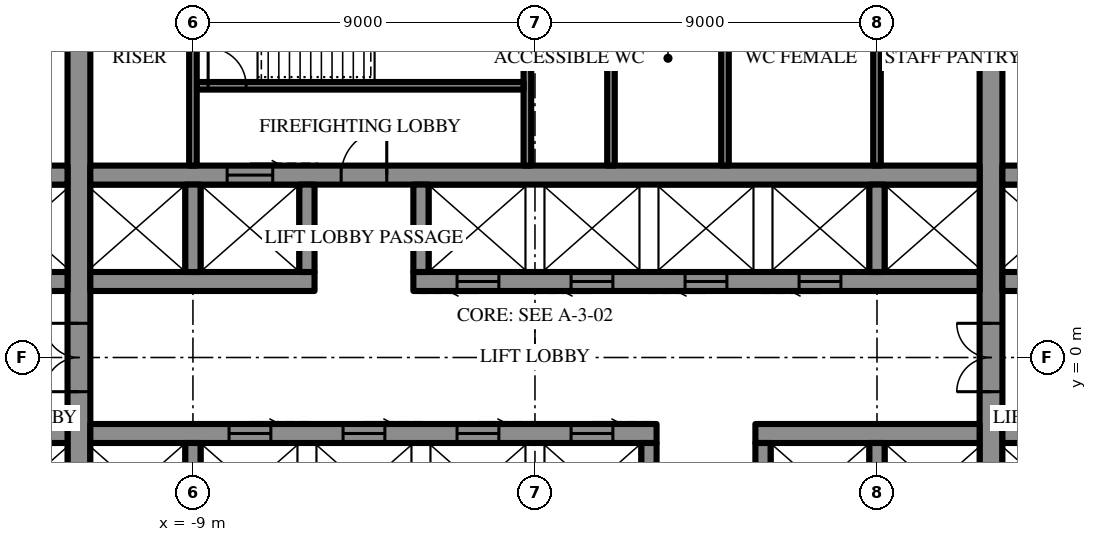
"""IFC4 building model, lengths in metres.
Left out: names, types, materials, properties, quantities, classifications, styles, units other than length and angle.
Written with IfcOpenShell. Run it as: python <this file> out.ifc"""

import sys

from ifc_helpers import new_model, si_unit, direction, frame, frame_2d, origin, place, context, subcontext, project, spatial, rectangle, extrude, element, fill, save


model = new_model("IFC4")
c1 = context("Model", 3, precision=1e-05, world=origin(), true_north=direction((0.0, 1.0)))
c2 = subcontext(c1, "Body", "Model", "MODEL_VIEW")
j1 = project(units=[si_unit("LENGTHUNIT", "METRE"), si_unit("PLANEANGLEUNIT", "RADIAN")], contexts=[c1])
p1 = place(None, origin())
s1 = spatial("IfcSite", under=j1, at=p1, CompositionType="ELEMENT")
p2 = place(p1, origin())
s2 = spatial("IfcBuilding", under=s1, at=p2, CompositionType="ELEMENT")
p3 = place(p2, frame((0.0, 0.0, 165.7)))
s3 = spatial("IfcBuildingStorey", under=s2, at=p3, CompositionType="ELEMENT", Elevation=165.7)
p4 = place(p3, frame((12.0, -10.7, 0.0), z_axis=(0.0, 0.0, 1.0), x_axis=(0.0, 1.0, 0.0)))
e1 = element("IfcWall", 1, at=p4, inside=s3, PredefinedType="SHEAR", context=c2, shape_type="SweptSolid", body=[
    extrude(rectangle(XDim=21.4, YDim=0.6, at=frame_2d((10.7, 0.0))), origin(), (0.0, 0.0, 1.0), 4.2),
])
p5 = place(p4, frame((9.8, 0.0, 0.0)))
e2 = element("IfcOpeningElement", 2, at=p5, cuts=e1, PredefinedType="OPENING", context=c2, shape_type="SweptSolid", body=[
    extrude(rectangle(XDim=1.8, YDim=2.4, at=frame_2d((0.9, 1.2))), frame((0.0, 0.31, 0.0), z_axis=(0.0, -1.0, 0.0), x_axis=(1.0, 0.0, 0.0)), (0.0, 0.0, 1.0), 0.62),
])
p6 = place(p3, frame((-12.0, -10.7, 0.0), z_axis=(0.0, 0.0, 1.0), x_axis=(0.0, 1.0, 0.0)))
e3 = element("IfcWall", 3, at=p6, inside=s3, PredefinedType="SHEAR", context=c2, shape_type="SweptSolid", body=[
    extrude(rectangle(XDim=21.4, YDim=0.6, at=frame_2d((10.7, 0.0))), origin(), (0.0, 0.0, 1.0), 4.2),
])
p7 = place(p6, frame((9.8, 0.0, 0.0)))
e4 = element("IfcOpeningElement", 4, at=p7, cuts=e3, PredefinedType="OPENING", context=c2, shape_type="SweptSolid", body=[
    extrude(rectangle(XDim=1.8, YDim=2.4, at=frame_2d((0.9, 1.2))), frame((0.0, 0.31, 0.0), z_axis=(0.0, -1.0, 0.0), x_axis=(1.0, 0.0, 0.0)), (0.0, 0.0, 1.0), 0.62),
])
p8 = place(p3, frame((-14.7, 2.0, 0.0), z_axis=(0.0, 0.0, 1.0), x_axis=(1.0, 0.0, 0.0)))
e5 = element("IfcWall", 5, at=p8, inside=s3, PredefinedType="SHEAR", context=c2, shape_type="SweptSolid", body=[
    extrude(rectangle(XDim=2.4, YDim=0.5, at=frame_2d((1.2, 0.0))), origin(), (0.0, 0.0, 1.0), 4.2),
])
p9 = place(p3, frame((-11.7, 2.0, 0.0), z_axis=(0.0, 0.0, 1.0), x_axis=(1.0, 0.0, 0.0)))
e6 = element("IfcWall", 6, at=p9, inside=s3, PredefinedType="SHEAR", context=c2, shape_type="SweptSolid", body=[
    extrude(rectangle(XDim=5.9, YDim=0.5, at=frame_2d((2.95, 0.0))), origin(), (0.0, 0.0, 1.0), 4.2),
])
p10 = place(p3, frame((-3.2, 2.0, 0.0), z_axis=(0.0, 0.0, 1.0), x_axis=(1.0, 0.0, 0.0)))
e7 = element("IfcWall", 7, at=p10, inside=s3, PredefinedType="SHEAR", context=c2, shape_type="SweptSolid", body=[
    extrude(rectangle(XDim=14.9, YDim=0.5, at=frame_2d((7.45, 0.0))), origin(), (0.0, 0.0, 1.0), 4.2),
])
p11 = place(p10, frame((1.15, 0.0, 0.0)))
e8 = element("IfcOpeningElement", 8, at=p11, cuts=e7, PredefinedType="OPENING", context=c2, shape_type="SweptSolid", body=[
    extrude(rectangle(XDim=1.1, YDim=2.2, at=frame_2d((0.55, 1.1))), frame((0.0, 0.26, 0.0), z_axis=(0.0, -1.0, 0.0), x_axis=(1.0, 0.0, 0.0)), (0.0, 0.0, 1.0), 0.52),
])
p12 = place(p10, frame((4.15, 0.0, 0.0)))
e9 = element("IfcOpeningElement", 9, at=p12, cuts=e7, PredefinedType="OPENING", context=c2, shape_type="SweptSolid", body=[
    extrude(rectangle(XDim=1.1, YDim=2.2, at=frame_2d((0.55, 1.1))), frame((0.0, 0.26, 0.0), z_axis=(0.0, -1.0, 0.0), x_axis=(1.0, 0.0, 0.0)), (0.0, 0.0, 1.0), 0.52),
])
p13 = place(p10, frame((7.15, 0.0, 0.0)))
e10 = element("IfcOpeningElement", 10, at=p13, cuts=e7, PredefinedType="OPENING", context=c2, shape_type="SweptSolid", body=[
    extrude(rectangle(XDim=1.1, YDim=2.2, at=frame_2d((0.55, 1.1))), frame((0.0, 0.26, 0.0), z_axis=(0.0, -1.0, 0.0), x_axis=(1.0, 0.0, 0.0)), (0.0, 0.0, 1.0), 0.52),
])
p14 = place(p10, frame((10.15, 0.0, 0.0)))
e11 = element("IfcOpeningElement", 11, at=p14, cuts=e7, PredefinedType="OPENING", context=c2, shape_type="SweptSolid", body=[
    extrude(rectangle(XDim=1.1, YDim=2.2, at=frame_2d((0.55, 1.1))), frame((0.0, 0.26, 0.0), z_axis=(0.0, -1.0, 0.0), x_axis=(1.0, 0.0, 0.0)), (0.0, 0.0, 1.0), 0.52),
])
for number, where, z_axis, x_axis in (
    (12, (12.3, 2.0, 0.0), (0.0, 0.0, 1.0), (1.0, 0.0, 0.0)),
    (13, (-14.7, 4.8, 0.0), (0.0, 0.0, 1.0), (1.0, 0.0, 0.0)),
):
    element("IfcWall", number, at=place(p3, frame(where, z_axis=z_axis, x_axis=x_axis)), inside=s3, PredefinedType="SHEAR", context=c2, shape_type="SweptSolid", body=[
        extrude(rectangle(XDim=2.4, YDim=0.5, at=frame_2d((1.2, 0.0))), origin(), (0.0, 0.0, 1.0), 4.2),
    ])
p15 = place(p3, frame((-11.7, 4.8, 0.0), z_axis=(0.0, 0.0, 1.0), x_axis=(1.0, 0.0, 0.0)))
e14 = element("IfcWall", 14, at=p15, inside=s3, PredefinedType="SHEAR", context=c2, shape_type="SweptSolid", body=[
    extrude(rectangle(XDim=23.4, YDim=0.5, at=frame_2d((11.7, 0.0))), origin(), (0.0, 0.0, 1.0), 4.2),
])
p16 = place(p15, frame((6.6, 0.0, 0.0)))
e15 = element("IfcOpeningElement", 15, at=p16, cuts=e14, PredefinedType="OPENING", context=c2, shape_type="SweptSolid", body=[
    extrude(rectangle(XDim=1.2, YDim=2.2, at=frame_2d((0.6, 1.1))), frame((0.0, 0.26, 0.0), z_axis=(0.0, -1.0, 0.0), x_axis=(1.0, 0.0, 0.0)), (0.0, 0.0, 1.0), 0.52),
])
p17 = place(p15, frame((3.6, 0.0, 0.0)))
e16 = element("IfcOpeningElement", 16, at=p17, cuts=e14, PredefinedType="OPENING", context=c2, shape_type="SweptSolid", body=[
    extrude(rectangle(XDim=1.2, YDim=2.2, at=frame_2d((0.6, 1.1))), frame((0.0, 0.26, 0.0), z_axis=(0.0, -1.0, 0.0), x_axis=(1.0, 0.0, 0.0)), (0.0, 0.0, 1.0), 0.52),
])
p18 = place(p3, frame((12.3, 4.8, 0.0), z_axis=(0.0, 0.0, 1.0), x_axis=(1.0, 0.0, 0.0)))
e17 = element("IfcWall", 17, at=p18, inside=s3, PredefinedType="SHEAR", context=c2, shape_type="SweptSolid", body=[
    extrude(rectangle(XDim=2.4, YDim=0.5, at=frame_2d((1.2, 0.0))), origin(), (0.0, 0.0, 1.0), 4.2),
])
for number, where, z_axis, x_axis in (
    (18, (-9.0, 2.25, 0.0), (0.0, 0.0, 1.0), (0.0, 1.0, 0.0)),
    (19, (-6.0, 2.25, 0.0), (0.0, 0.0, 1.0), (0.0, 1.0, 0.0)),
    (20, (-3.0, 2.25, 0.0), (0.0, 0.0, 1.0), (0.0, 1.0, 0.0)),
    (21, (9.0, 2.25, 0.0), (0.0, 0.0, 1.0), (0.0, 1.0, 0.0)),
):
    element("IfcWall", number, at=place(p3, frame(where, z_axis=z_axis, x_axis=x_axis)), inside=s3, PredefinedType="SHEAR", context=c2, shape_type="SweptSolid", body=[
        extrude(rectangle(XDim=2.3, YDim=0.4, at=frame_2d((1.15, 0.0))), origin(), (0.0, 0.0, 1.0), 4.2),
    ])
p19 = place(p3, frame((-0.2, 5.05, 0.0), z_axis=(0.0, 0.0, 1.0), x_axis=(0.0, 1.0, 0.0)))
e22 = element("IfcWall", 22, at=p19, inside=s3, PredefinedType="SHEAR", context=c2, shape_type="SweptSolid", body=[
    extrude(rectangle(XDim=5.65, YDim=0.2, at=frame_2d((2.825, 0.0))), origin(), (0.0, 0.0, 1.0), 4.2),
])
p20 = place(p3, frame((-8.9, 7.15, 0.0), z_axis=(0.0, 0.0, 1.0), x_axis=(1.0, 0.0, 0.0)))
e23 = element("IfcWall", 23, at=p20, inside=s3, PredefinedType="SHEAR", context=c2, shape_type="SweptSolid", body=[
    extrude(rectangle(XDim=8.6, YDim=0.2, at=frame_2d((4.3, 0.0))), origin(), (0.0, 0.0, 1.0), 4.2),
])
p21 = place(p20, frame((0.3, 0.0, 0.0)))
e24 = element("IfcOpeningElement", 24, at=p21, cuts=e23, PredefinedType="OPENING", context=c2, shape_type="SweptSolid", body=[
    extrude(rectangle(XDim=1.0, YDim=2.2, at=frame_2d((0.5, 1.1))), frame((0.0, 0.11, 0.0), z_axis=(0.0, -1.0, 0.0), x_axis=(1.0, 0.0, 0.0)), (0.0, 0.0, 1.0), 0.22),
])
p22 = place(p3, frame((14.7, -2.0, 0.0), z_axis=(0.0, 0.0, 1.0), x_axis=(-1.0, 0.0, 0.0)))
e25 = element("IfcWall", 25, at=p22, inside=s3, PredefinedType="SHEAR", context=c2, shape_type="SweptSolid", body=[
    extrude(rectangle(XDim=2.4, YDim=0.5, at=frame_2d((1.2, 0.0))), origin(), (0.0, 0.0, 1.0), 4.2),
])
p23 = place(p3, frame((11.7, -2.0, 0.0), z_axis=(0.0, 0.0, 1.0), x_axis=(-1.0, 0.0, 0.0)))
e26 = element("IfcWall", 26, at=p23, inside=s3, PredefinedType="SHEAR", context=c2, shape_type="SweptSolid", body=[
    extrude(rectangle(XDim=5.9, YDim=0.5, at=frame_2d((2.95, 0.0))), origin(), (0.0, 0.0, 1.0), 4.2),
])
p24 = place(p3, frame((3.2, -2.0, 0.0), z_axis=(0.0, 0.0, 1.0), x_axis=(-1.0, 0.0, 0.0)))
e27 = element("IfcWall", 27, at=p24, inside=s3, PredefinedType="SHEAR", context=c2, shape_type="SweptSolid", body=[
    extrude(rectangle(XDim=14.9, YDim=0.5, at=frame_2d((7.45, 0.0))), origin(), (0.0, 0.0, 1.0), 4.2),
])
p25 = place(p24, frame((1.15, 0.0, 0.0)))
e28 = element("IfcOpeningElement", 28, at=p25, cuts=e27, PredefinedType="OPENING", context=c2, shape_type="SweptSolid", body=[
    extrude(rectangle(XDim=1.1, YDim=2.2, at=frame_2d((0.55, 1.1))), frame((0.0, 0.26, 0.0), z_axis=(0.0, -1.0, 0.0), x_axis=(1.0, 0.0, 0.0)), (0.0, 0.0, 1.0), 0.52),
])
p26 = place(p24, frame((4.15, 0.0, 0.0)))
e29 = element("IfcOpeningElement", 29, at=p26, cuts=e27, PredefinedType="OPENING", context=c2, shape_type="SweptSolid", body=[
    extrude(rectangle(XDim=1.1, YDim=2.2, at=frame_2d((0.55, 1.1))), frame((0.0, 0.26, 0.0), z_axis=(0.0, -1.0, 0.0), x_axis=(1.0, 0.0, 0.0)), (0.0, 0.0, 1.0), 0.52),
])
p27 = place(p24, frame((7.15, 0.0, 0.0)))
e30 = element("IfcOpeningElement", 30, at=p27, cuts=e27, PredefinedType="OPENING", context=c2, shape_type="SweptSolid", body=[
    extrude(rectangle(XDim=1.1, YDim=2.2, at=frame_2d((0.55, 1.1))), frame((0.0, 0.26, 0.0), z_axis=(0.0, -1.0, 0.0), x_axis=(1.0, 0.0, 0.0)), (0.0, 0.0, 1.0), 0.52),
])
p28 = place(p24, frame((10.15, 0.0, 0.0)))
e31 = element("IfcOpeningElement", 31, at=p28, cuts=e27, PredefinedType="OPENING", context=c2, shape_type="SweptSolid", body=[
    extrude(rectangle(XDim=1.1, YDim=2.2, at=frame_2d((0.55, 1.1))), frame((0.0, 0.26, 0.0), z_axis=(0.0, -1.0, 0.0), x_axis=(1.0, 0.0, 0.0)), (0.0, 0.0, 1.0), 0.52),
])
p29 = place(p3, frame((-12.3, -2.0, 0.0), z_axis=(0.0, 0.0, 1.0), x_axis=(-1.0, 0.0, 0.0)))
e32 = element("IfcWall", 32, at=p29, inside=s3, PredefinedType="SHEAR", context=c2, shape_type="SweptSolid", body=[
    extrude(rectangle(XDim=2.4, YDim=0.5, at=frame_2d((1.2, 0.0))), origin(), (0.0, 0.0, 1.0), 4.2),
])
for number, where, z_axis, x_axis in (
    (33, (9.0, -2.25, 0.0), (0.0, 0.0, 1.0), (0.0, -1.0, 0.0)),
    (34, (6.0, -2.25, 0.0), (0.0, 0.0, 1.0), (0.0, -1.0, 0.0)),
    (35, (3.0, -2.25, 0.0), (0.0, 0.0, 1.0), (0.0, -1.0, 0.0)),
    (36, (-9.0, -2.25, 0.0), (0.0, 0.0, 1.0), (0.0, -1.0, 0.0)),
):
    element("IfcWall", number, at=place(p3, frame(where, z_axis=z_axis, x_axis=x_axis)), inside=s3, PredefinedType="SHEAR", context=c2, shape_type="SweptSolid", body=[
        extrude(rectangle(XDim=2.3, YDim=0.4, at=frame_2d((1.15, 0.0))), origin(), (0.0, 0.0, 1.0), 4.2),
    ])
for number, where, z_axis, x_axis in (
    (37, (-9.0, 5.05, 0.0), (0.0, 0.0, 1.0), (0.0, 1.0, 0.0)),
    (38, (9.0, 5.05, 0.0), (0.0, 0.0, 1.0), (0.0, 1.0, 0.0)),
    (39, (2.0, 5.05, 0.0), (0.0, 0.0, 1.0), (0.0, 1.0, 0.0)),
    (40, (5.0, 5.05, 0.0), (0.0, 0.0, 1.0), (0.0, 1.0, 0.0)),
):
    element("IfcWall", number, at=place(p3, frame(where, z_axis=z_axis, x_axis=x_axis)), inside=s3, PredefinedType="PARTITIONING", context=c2, shape_type="SweptSolid", body=[
        extrude(rectangle(XDim=5.65, YDim=0.2, at=frame_2d((2.825, 0.0))), origin(), (0.0, 0.0, 1.0), 4.0),
    ])
p30 = place(p16, origin())
e41 = element("IfcDoor", 41, at=p30, inside=s3, OperationType="SINGLE_SWING_LEFT", PredefinedType="DOOR", context=c2, shape_type="SweptSolid", body=[
    extrude(rectangle(XDim=1.2, YDim=2.2, at=frame_2d((0.6, 1.1))), frame((0.0, 0.025, 0.0), z_axis=(0.0, -1.0, 0.0), x_axis=(1.0, 0.0, 0.0)), (0.0, 0.0, 1.0), 0.05),
])
fill(e15, e41)
p31 = place(p21, origin())
e42 = element("IfcDoor", 42, at=p31, inside=s3, OperationType="SINGLE_SWING_RIGHT", PredefinedType="DOOR", context=c2, shape_type="SweptSolid", body=[
    extrude(rectangle(XDim=1.0, YDim=2.2, at=frame_2d((0.5, 1.1))), frame((0.0, 0.025, 0.0), z_axis=(0.0, -1.0, 0.0), x_axis=(1.0, 0.0, 0.0)), (0.0, 0.0, 1.0), 0.05),
])
fill(e24, e42)
p32 = place(p5, origin())
e43 = element("IfcDoor", 43, at=p32, inside=s3, OperationType="DOUBLE_DOOR_SINGLE_SWING", PredefinedType="DOOR", context=c2, shape_type="SweptSolid", body=[
    extrude(rectangle(XDim=1.8, YDim=2.4, at=frame_2d((0.9, 1.2))), frame((0.0, 0.025, 0.0), z_axis=(0.0, -1.0, 0.0), x_axis=(1.0, 0.0, 0.0)), (0.0, 0.0, 1.0), 0.05),
])
fill(e2, e43)
p33 = place(p7, origin())
e44 = element("IfcDoor", 44, at=p33, inside=s3, OperationType="DOUBLE_DOOR_SINGLE_SWING", PredefinedType="DOOR", context=c2, shape_type="SweptSolid", body=[
    extrude(rectangle(XDim=1.8, YDim=2.4, at=frame_2d((0.9, 1.2))), frame((0.0, 0.025, 0.0), z_axis=(0.0, -1.0, 0.0), x_axis=(1.0, 0.0, 0.0)), (0.0, 0.0, 1.0), 0.05),
])
fill(e4, e44)
p34 = place(p17, origin())
e45 = element("IfcDoor", 45, at=p34, inside=s3, OperationType="SLIDING_TO_LEFT", PredefinedType="DOOR", context=c2, shape_type="SweptSolid", body=[
    extrude(rectangle(XDim=1.2, YDim=2.2, at=frame_2d((0.6, 1.1))), frame((0.0, 0.025, 0.0), z_axis=(0.0, -1.0, 0.0), x_axis=(1.0, 0.0, 0.0)), (0.0, 0.0, 1.0), 0.05),
])
fill(e16, e45)
p35 = place(p11, frame((1.1, 0.0, 0.0), z_axis=(0.0, 0.0, 1.0), x_axis=(-1.0, 0.0, 0.0)))
e46 = element("IfcDoor", 46, at=p35, inside=s3, OperationType="SLIDING_TO_LEFT", PredefinedType="DOOR", context=c2, shape_type="SweptSolid", body=[
    extrude(rectangle(XDim=1.1, YDim=2.2, at=frame_2d((0.55, 1.1))), frame((0.0, 0.025, 0.0), z_axis=(0.0, -1.0, 0.0), x_axis=(1.0, 0.0, 0.0)), (0.0, 0.0, 1.0), 0.05),
])
fill(e8, e46)
p36 = place(p12, frame((1.1, 0.0, 0.0), z_axis=(0.0, 0.0, 1.0), x_axis=(-1.0, 0.0, 0.0)))
e47 = element("IfcDoor", 47, at=p36, inside=s3, OperationType="SLIDING_TO_LEFT", PredefinedType="DOOR", context=c2, shape_type="SweptSolid", body=[
    extrude(rectangle(XDim=1.1, YDim=2.2, at=frame_2d((0.55, 1.1))), frame((0.0, 0.025, 0.0), z_axis=(0.0, -1.0, 0.0), x_axis=(1.0, 0.0, 0.0)), (0.0, 0.0, 1.0), 0.05),
])
fill(e9, e47)
p37 = place(p13, frame((1.1, 0.0, 0.0), z_axis=(0.0, 0.0, 1.0), x_axis=(-1.0, 0.0, 0.0)))
e48 = element("IfcDoor", 48, at=p37, inside=s3, OperationType="SLIDING_TO_LEFT", PredefinedType="DOOR", context=c2, shape_type="SweptSolid", body=[
    extrude(rectangle(XDim=1.1, YDim=2.2, at=frame_2d((0.55, 1.1))), frame((0.0, 0.025, 0.0), z_axis=(0.0, -1.0, 0.0), x_axis=(1.0, 0.0, 0.0)), (0.0, 0.0, 1.0), 0.05),
])
fill(e10, e48)
p38 = place(p14, frame((1.1, 0.0, 0.0), z_axis=(0.0, 0.0, 1.0), x_axis=(-1.0, 0.0, 0.0)))
e49 = element("IfcDoor", 49, at=p38, inside=s3, OperationType="SLIDING_TO_LEFT", PredefinedType="DOOR", context=c2, shape_type="SweptSolid", body=[
    extrude(rectangle(XDim=1.1, YDim=2.2, at=frame_2d((0.55, 1.1))), frame((0.0, 0.025, 0.0), z_axis=(0.0, -1.0, 0.0), x_axis=(1.0, 0.0, 0.0)), (0.0, 0.0, 1.0), 0.05),
])
fill(e11, e49)
p39 = place(p25, frame((1.1, 0.0, 0.0), z_axis=(0.0, 0.0, 1.0), x_axis=(-1.0, 0.0, 0.0)))
e50 = element("IfcDoor", 50, at=p39, inside=s3, OperationType="SLIDING_TO_LEFT", PredefinedType="DOOR", context=c2, shape_type="SweptSolid", body=[
    extrude(rectangle(XDim=1.1, YDim=2.2, at=frame_2d((0.55, 1.1))), frame((0.0, 0.025, 0.0), z_axis=(0.0, -1.0, 0.0), x_axis=(1.0, 0.0, 0.0)), (0.0, 0.0, 1.0), 0.05),
])
fill(e28, e50)
p40 = place(p26, frame((1.1, 0.0, 0.0), z_axis=(0.0, 0.0, 1.0), x_axis=(-1.0, 0.0, 0.0)))
e51 = element("IfcDoor", 51, at=p40, inside=s3, OperationType="SLIDING_TO_LEFT", PredefinedType="DOOR", context=c2, shape_type="SweptSolid", body=[
    extrude(rectangle(XDim=1.1, YDim=2.2, at=frame_2d((0.55, 1.1))), frame((0.0, 0.025, 0.0), z_axis=(0.0, -1.0, 0.0), x_axis=(1.0, 0.0, 0.0)), (0.0, 0.0, 1.0), 0.05),
])
fill(e29, e51)
p41 = place(p27, frame((1.1, 0.0, 0.0), z_axis=(0.0, 0.0, 1.0), x_axis=(-1.0, 0.0, 0.0)))
e52 = element("IfcDoor", 52, at=p41, inside=s3, OperationType="SLIDING_TO_LEFT", PredefinedType="DOOR", context=c2, shape_type="SweptSolid", body=[
    extrude(rectangle(XDim=1.1, YDim=2.2, at=frame_2d((0.55, 1.1))), frame((0.0, 0.025, 0.0), z_axis=(0.0, -1.0, 0.0), x_axis=(1.0, 0.0, 0.0)), (0.0, 0.0, 1.0), 0.05),
])
fill(e30, e52)
p42 = place(p28, frame((1.1, 0.0, 0.0), z_axis=(0.0, 0.0, 1.0), x_axis=(-1.0, 0.0, 0.0)))
e53 = element("IfcDoor", 53, at=p42, inside=s3, OperationType="SLIDING_TO_LEFT", PredefinedType="DOOR", context=c2, shape_type="SweptSolid", body=[
    extrude(rectangle(XDim=1.1, YDim=2.2, at=frame_2d((0.55, 1.1))), frame((0.0, 0.025, 0.0), z_axis=(0.0, -1.0, 0.0), x_axis=(1.0, 0.0, 0.0)), (0.0, 0.0, 1.0), 0.05),
])
fill(e31, e53)
save(model, sys.argv[1])
